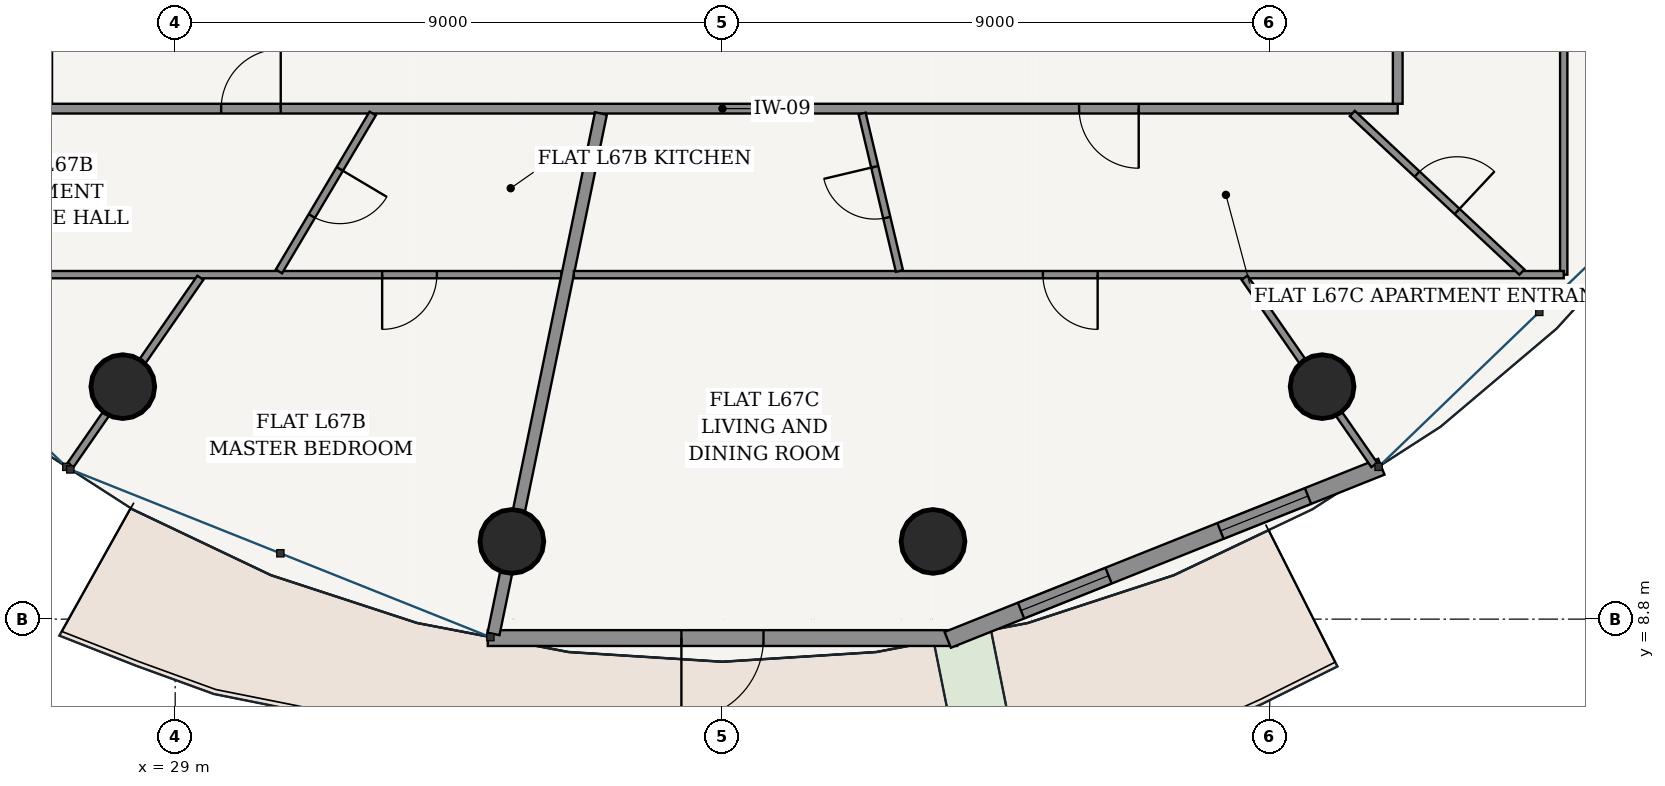
"""IFC4 building model, lengths in metres.
Left out: names, types, materials, properties, quantities, classifications, styles, units other than length and angle.
Written with IfcOpenShell. Run it as: python <this file> out.ifc"""

import sys

from ifc_helpers import new_model, si_unit, direction, frame, frame_2d, origin, origin_2d, place, context, subcontext, project, spatial, rectangle, hollow_circle, extrude, source, transform, mapped, element, fill, save


model = new_model("IFC4")
c1 = context("Model", 3, precision=1e-05, world=origin(), true_north=direction((-0.2419218956, 0.970295726276)))
c2 = subcontext(c1, "Body", "Model", "MODEL_VIEW")
j1 = project(units=[si_unit("LENGTHUNIT", "METRE"), si_unit("PLANEANGLEUNIT", "RADIAN")], contexts=[c1])
p1 = place(None, origin())
s1 = spatial("IfcSite", under=j1, at=p1, CompositionType="ELEMENT")
p2 = place(p1, origin())
s2 = spatial("IfcBuilding", under=s1, at=p2, CompositionType="ELEMENT")
p3 = place(p2, frame((0.0, 0.0, 255.7)))
s3 = spatial("IfcBuildingStorey", under=s2, at=p3, CompositionType="ELEMENT", Elevation=255.7)
for number, where, z_axis, x_axis in (
    (1, (28.139, 12.624, 0.0), (0.0, 0.0, 1.0), (1.0, 0.0, 0.0)),
    (2, (34.537, 10.078, 0.0), (0.0, 0.0, 1.0), (1.0, 0.0, 0.0)),
    (3, (41.463, 10.078, 0.0), (0.0, 0.0, 1.0), (1.0, 0.0, 0.0)),
    (4, (47.861, 12.624, 0.0), (0.0, 0.0, 1.0), (1.0, 0.0, 0.0)),
):
    element("IfcColumn", number, at=place(p3, frame(where, z_axis=z_axis, x_axis=x_axis)), inside=s3, PredefinedType="COLUMN", context=c2, shape_type="SweptSolid", body=[
        extrude(hollow_circle(Radius=0.525, WallThickness=0.035, at=origin_2d()), origin(), (0.0, 0.0, 1.0), 3.75),
    ])
p4 = place(p3, frame((34.141, 8.489, 0.0), z_axis=(0.0, 0.0, 1.0), x_axis=(1.0, 0.0, 0.0)))
e5 = element("IfcWall", 5, at=p4, inside=s3, PredefinedType="SOLIDWALL", context=c2, shape_type="SweptSolid", body=[
    extrude(rectangle(XDim=7.718, YDim=0.26, at=frame_2d((3.859, 0.0))), origin(), (0.0, 0.0, 1.0), 3.49),
])
p5 = place(p4, frame((3.184, 0.0, 0.0)))
e6 = element("IfcOpeningElement", 6, at=p5, cuts=e5, PredefinedType="OPENING", context=c2, shape_type="SweptSolid", body=[
    extrude(rectangle(XDim=1.35, YDim=2.2, at=frame_2d((0.675, 1.1))), frame((0.0, 0.14, 0.0), z_axis=(0.0, -1.0, 0.0), x_axis=(1.0, 0.0, 0.0)), (0.0, 0.0, 1.0), 0.28),
])
p6 = place(p3, frame((41.705, 8.459, 0.0), z_axis=(0.0, 0.0, 1.0), x_axis=(0.92871332341, 0.370798547626, 0.0)))
e7 = element("IfcWall", 7, at=p6, inside=s3, PredefinedType="SOLIDWALL", context=c2, shape_type="SweptSolid", body=[
    extrude(rectangle(XDim=7.678, YDim=0.28, at=frame_2d((3.839, 0.0))), origin(), (0.0, 0.0, 1.0), 3.49),
])
p7 = place(p6, frame((1.298, 0.0, 0.85)))
e8 = element("IfcOpeningElement", 8, at=p7, cuts=e7, PredefinedType="OPENING", context=c2, shape_type="SweptSolid", body=[
    extrude(rectangle(XDim=1.55, YDim=1.95, at=frame_2d((0.775, 0.975))), frame((0.0, 0.15, 0.0), z_axis=(0.0, -1.0, 0.0), x_axis=(1.0, 0.0, 0.0)), (0.0, 0.0, 1.0), 0.3),
])
p8 = place(p6, frame((4.83, 0.0, 0.85)))
e9 = element("IfcOpeningElement", 9, at=p8, cuts=e7, PredefinedType="OPENING", context=c2, shape_type="SweptSolid", body=[
    extrude(rectangle(XDim=1.55, YDim=1.95, at=frame_2d((0.775, 0.975))), frame((0.0, 0.15, 0.0), z_axis=(0.0, -1.0, 0.0), x_axis=(1.0, 0.0, 0.0)), (0.0, 0.0, 1.0), 0.3),
])
p9 = place(p3, frame((26.895, 17.195, 0.0), z_axis=(0.0, 0.0, 1.0), x_axis=(1.0, 0.0, 0.0)))
e10 = element("IfcWall", 10, at=p9, inside=s3, PredefinedType="PARTITIONING", context=c2, shape_type="SweptSolid", body=[
    extrude(rectangle(XDim=22.21, YDim=0.16, at=frame_2d((11.105, 0.0))), origin(), (0.0, 0.0, 1.0), 3.015),
])
p10 = place(p9, frame((2.861, 0.0, 0.0)))
e11 = element("IfcOpeningElement", 11, at=p10, cuts=e10, PredefinedType="OPENING", context=c2, shape_type="SweptSolid", body=[
    extrude(rectangle(XDim=0.98, YDim=2.2, at=frame_2d((0.49, 1.1))), frame((0.0, 0.09, 0.0), z_axis=(0.0, -1.0, 0.0), x_axis=(1.0, 0.0, 0.0)), (0.0, 0.0, 1.0), 0.18),
])
p11 = place(p9, frame((16.97, 0.0, 0.0)))
e12 = element("IfcOpeningElement", 12, at=p11, cuts=e10, PredefinedType="OPENING", context=c2, shape_type="SweptSolid", body=[
    extrude(rectangle(XDim=0.98, YDim=2.2, at=frame_2d((0.49, 1.1))), frame((0.0, 0.09, 0.0), z_axis=(0.0, -1.0, 0.0), x_axis=(1.0, 0.0, 0.0)), (0.0, 0.0, 1.0), 0.18),
])
for number, where, z_axis, x_axis in (
    (13, (26.895, 17.275, 0.0), (0.0, 0.0, 1.0), (0.0, 1.0, 0.0)),
    (14, (49.105, 17.275, 0.0), (0.0, 0.0, 1.0), (0.0, 1.0, 0.0)),
):
    element("IfcWall", number, at=place(p3, frame(where, z_axis=z_axis, x_axis=x_axis)), inside=s3, PredefinedType="PARTITIONING", context=c2, shape_type="SweptSolid", body=[
        extrude(rectangle(XDim=13.925, YDim=0.16, at=frame_2d((6.962, 0.0))), origin(), (0.0, 0.0, 1.0), 3.015),
    ])
p12 = place(p3, frame((35.353, 14.465, 0.0), z_axis=(0.0, 0.0, 1.0), x_axis=(-1.0, 0.0, 0.0)))
e15 = element("IfcWall", 15, at=p12, inside=s3, PredefinedType="PARTITIONING", context=c2, shape_type="SweptSolid", body=[
    extrude(rectangle(XDim=11.188, YDim=0.12, at=frame_2d((5.594, 0.0))), origin(), (0.0, 0.0, 1.0), 3.015),
])
p13 = place(p12, frame((2.049, 0.0, 0.0)))
e16 = element("IfcOpeningElement", 16, at=p13, cuts=e15, PredefinedType="OPENING", context=c2, shape_type="SweptSolid", body=[
    extrude(rectangle(XDim=0.9, YDim=2.15, at=frame_2d((0.45, 1.075))), frame((0.0, 0.07, 0.0), z_axis=(0.0, -1.0, 0.0), x_axis=(1.0, 0.0, 0.0)), (0.0, 0.0, 1.0), 0.14),
])
p14 = place(p3, frame((29.414, 14.414, 0.0), z_axis=(0.0, 0.0, 1.0), x_axis=(-0.569657021681, -0.821882520589, 0.0)))
e17 = element("IfcWall", 17, at=p14, inside=s3, PredefinedType="PARTITIONING", context=c2, shape_type="SweptSolid", body=[
    extrude(rectangle(XDim=3.748, YDim=0.12, at=frame_2d((1.874, 0.0))), origin(), (0.0, 0.0, 1.0), 3.015),
])
p15 = place(p3, frame((32.248, 17.115, 0.0), z_axis=(0.0, 0.0, 1.0), x_axis=(-0.510591051721, -0.85982369001, 0.0)))
e18 = element("IfcWall", 18, at=p15, inside=s3, PredefinedType="PARTITIONING", context=c2, shape_type="SweptSolid", body=[
    extrude(rectangle(XDim=3.02, YDim=0.12, at=frame_2d((1.51, 0.0))), origin(), (0.0, 0.0, 1.0), 3.209),
])
p16 = place(p15, frame((1.06, 0.0, 0.0)))
e19 = element("IfcOpeningElement", 19, at=p16, cuts=e18, PredefinedType="OPENING", context=c2, shape_type="SweptSolid", body=[
    extrude(rectangle(XDim=0.9, YDim=2.15, at=frame_2d((0.45, 1.075))), frame((0.0, 0.07, 0.0), z_axis=(0.0, -1.0, 0.0), x_axis=(1.0, 0.0, 0.0)), (0.0, 0.0, 1.0), 0.14),
])
p17 = place(p3, frame((36.001, 17.115, 0.0), z_axis=(0.0, 0.0, 1.0), x_axis=(-0.202108543081, -0.979363128167, 0.0)))
e20 = element("IfcWall", 20, at=p17, inside=s3, PredefinedType="PARTITIONING", context=c2, shape_type="SweptSolid", body=[
    extrude(rectangle(XDim=8.739, YDim=0.2, at=frame_2d((4.369, 0.0))), origin(), (0.0, 0.0, 1.0), 3.015),
])
p18 = place(p3, frame((51.835, 21.174, 0.0), z_axis=(0.0, 0.0, 1.0), x_axis=(0.0, -1.0, 0.0)))
e21 = element("IfcWall", 21, at=p18, inside=s3, PredefinedType="PARTITIONING", context=c2, shape_type="SweptSolid", body=[
    extrude(rectangle(XDim=6.709, YDim=0.12, at=frame_2d((3.354, 0.0))), origin(), (0.0, 0.0, 1.0), 3.015),
])
p19 = place(p18, frame((1.888, 0.0, 0.0)))
e22 = element("IfcOpeningElement", 22, at=p19, cuts=e21, PredefinedType="OPENING", context=c2, shape_type="SweptSolid", body=[
    extrude(rectangle(XDim=0.9, YDim=2.15, at=frame_2d((0.45, 1.075))), frame((0.0, 0.07, 0.0), z_axis=(0.0, -1.0, 0.0), x_axis=(1.0, 0.0, 0.0)), (0.0, 0.0, 1.0), 0.14),
])
p20 = place(p3, frame((51.835, 14.465, 0.0), z_axis=(0.0, 0.0, 1.0), x_axis=(-1.0, 0.0, 0.0)))
e23 = element("IfcWall", 23, at=p20, inside=s3, PredefinedType="PARTITIONING", context=c2, shape_type="SweptSolid", body=[
    extrude(rectangle(XDim=16.278, YDim=0.12, at=frame_2d((8.139, 0.0))), origin(), (0.0, 0.0, 1.0), 3.015),
])
p21 = place(p20, frame((7.665, 0.0, 0.0)))
e24 = element("IfcOpeningElement", 24, at=p21, cuts=e23, PredefinedType="OPENING", context=c2, shape_type="SweptSolid", body=[
    extrude(rectangle(XDim=0.9, YDim=2.15, at=frame_2d((0.45, 1.075))), frame((0.0, 0.07, 0.0), z_axis=(0.0, -1.0, 0.0), x_axis=(1.0, 0.0, 0.0)), (0.0, 0.0, 1.0), 0.14),
])
p22 = place(p3, frame((46.586, 14.414, 0.0), z_axis=(0.0, 0.0, 1.0), x_axis=(0.569657021681, -0.821882520589, 0.0)))
e25 = element("IfcWall", 25, at=p22, inside=s3, PredefinedType="PARTITIONING", context=c2, shape_type="SweptSolid", body=[
    extrude(rectangle(XDim=3.748, YDim=0.12, at=frame_2d((1.874, 0.0))), origin(), (0.0, 0.0, 1.0), 3.015),
])
p23 = place(p3, frame((40.296, 17.115, 0.0), z_axis=(0.0, 0.0, 1.0), x_axis=(0.230710960444, -0.973022328999, 0.0)))
e26 = element("IfcWall", 26, at=p23, inside=s3, PredefinedType="PARTITIONING", context=c2, shape_type="SweptSolid", body=[
    extrude(rectangle(XDim=2.661, YDim=0.12, at=frame_2d((1.331, 0.0))), origin(), (0.0, 0.0, 1.0), 3.49),
])
p24 = place(p23, frame((0.901, 0.0, 0.0)))
e27 = element("IfcOpeningElement", 27, at=p24, cuts=e26, PredefinedType="OPENING", context=c2, shape_type="SweptSolid", body=[
    extrude(rectangle(XDim=0.86, YDim=2.15, at=frame_2d((0.43, 1.075))), frame((0.0, 0.07, 0.0), z_axis=(0.0, -1.0, 0.0), x_axis=(1.0, 0.0, 0.0)), (0.0, 0.0, 1.0), 0.14),
])
p25 = place(p3, frame((48.358, 17.115, 0.0), z_axis=(0.0, 0.0, 1.0), x_axis=(0.730431927487, -0.682985504464, 0.0)))
e28 = element("IfcWall", 28, at=p25, inside=s3, PredefinedType="PARTITIONING", context=c2, shape_type="SweptSolid", body=[
    extrude(rectangle(XDim=3.818, YDim=0.12, at=frame_2d((1.909, 0.0))), origin(), (0.0, 0.0, 1.0), 3.121),
])
p26 = place(p25, frame((1.459, 0.0, 0.0)))
e29 = element("IfcOpeningElement", 29, at=p26, cuts=e28, PredefinedType="OPENING", context=c2, shape_type="SweptSolid", body=[
    extrude(rectangle(XDim=0.9, YDim=2.15, at=frame_2d((0.45, 1.075))), frame((0.0, 0.07, 0.0), z_axis=(0.0, -1.0, 0.0), x_axis=(1.0, 0.0, 0.0)), (0.0, 0.0, 1.0), 0.14),
])
m1 = source(origin(), c2, "Body", "SweptSolid", [
    extrude(rectangle(XDim=1.35, YDim=2.2, at=frame_2d((0.675, 1.1))), frame((0.0, 0.025, 0.0), z_axis=(0.0, -1.0, 0.0), x_axis=(1.0, 0.0, 0.0)), (0.0, 0.0, 1.0), 0.05),
])
p27 = place(p5, frame((1.35, 0.0, 0.0), z_axis=(0.0, 0.0, 1.0), x_axis=(-1.0, 0.0, 0.0)))
e30 = element("IfcDoor", 30, at=p27, inside=s3, OperationType="SINGLE_SWING_RIGHT", PredefinedType="DOOR", context=c2, shape_type="MappedRepresentation", body=[
    mapped(m1, transform((0.0, 0.0, 0.0), scale=1.0)),
])
fill(e6, e30)
m2 = source(origin(), c2, "Body", "SweptSolid", [
    extrude(rectangle(XDim=1.55, YDim=1.95, at=frame_2d((0.775, 0.975))), frame((0.0, 0.03, 0.0), z_axis=(0.0, -1.0, 0.0), x_axis=(1.0, 0.0, 0.0)), (0.0, 0.0, 1.0), 0.06),
])
p28 = place(p7, origin())
e31 = element("IfcWindow", 31, at=p28, inside=s3, PartitioningType="SINGLE_PANEL", PredefinedType="WINDOW", context=c2, shape_type="MappedRepresentation", body=[
    mapped(m2, transform((0.0, 0.0, 0.0), scale=1.0)),
])
fill(e8, e31)
p29 = place(p8, origin())
e32 = element("IfcWindow", 32, at=p29, inside=s3, PartitioningType="SINGLE_PANEL", PredefinedType="WINDOW", context=c2, shape_type="MappedRepresentation", body=[
    mapped(m2, transform((0.0, 0.0, 0.0), scale=1.0)),
])
fill(e9, e32)
m3 = source(origin(), c2, "Body", "SweptSolid", [
    extrude(rectangle(XDim=0.98, YDim=2.2, at=frame_2d((0.49, 1.1))), frame((0.0, 0.025, 0.0), z_axis=(0.0, -1.0, 0.0), x_axis=(1.0, 0.0, 0.0)), (0.0, 0.0, 1.0), 0.05),
])
p30 = place(p10, origin())
e33 = element("IfcDoor", 33, at=p30, inside=s3, OperationType="SINGLE_SWING_RIGHT", PredefinedType="DOOR", context=c2, shape_type="MappedRepresentation", body=[
    mapped(m3, transform((0.0, 0.0, 0.0), scale=1.0)),
])
fill(e11, e33)
m4 = source(origin(), c2, "Body", "SweptSolid", [
    extrude(rectangle(XDim=0.9, YDim=2.15, at=frame_2d((0.45, 1.075))), frame((0.0, 0.025, 0.0), z_axis=(0.0, -1.0, 0.0), x_axis=(1.0, 0.0, 0.0)), (0.0, 0.0, 1.0), 0.05),
])
p31 = place(p16, origin())
e34 = element("IfcDoor", 34, at=p31, inside=s3, OperationType="SINGLE_SWING_LEFT", PredefinedType="DOOR", context=c2, shape_type="MappedRepresentation", body=[
    mapped(m4, transform((0.0, 0.0, 0.0), scale=1.0)),
])
fill(e19, e34)
p32 = place(p13, origin())
e35 = element("IfcDoor", 35, at=p32, inside=s3, OperationType="SINGLE_SWING_RIGHT", PredefinedType="DOOR", context=c2, shape_type="MappedRepresentation", body=[
    mapped(m4, transform((0.0, 0.0, 0.0), scale=1.0)),
])
fill(e16, e35)
p33 = place(p11, frame((0.98, 0.0, 0.0), z_axis=(0.0, 0.0, 1.0), x_axis=(-1.0, 0.0, 0.0)))
e36 = element("IfcDoor", 36, at=p33, inside=s3, OperationType="SINGLE_SWING_LEFT", PredefinedType="DOOR", context=c2, shape_type="MappedRepresentation", body=[
    mapped(m3, transform((0.0, 0.0, 0.0), scale=1.0)),
])
fill(e12, e36)
m5 = source(origin(), c2, "Body", "SweptSolid", [
    extrude(rectangle(XDim=0.86, YDim=2.15, at=frame_2d((0.43, 1.075))), frame((0.0, 0.025, 0.0), z_axis=(0.0, -1.0, 0.0), x_axis=(1.0, 0.0, 0.0)), (0.0, 0.0, 1.0), 0.05),
])
p34 = place(p24, frame((0.86, 0.0, 0.0), z_axis=(0.0, 0.0, 1.0), x_axis=(-1.0, 0.0, 0.0)))
e37 = element("IfcDoor", 37, at=p34, inside=s3, OperationType="SINGLE_SWING_RIGHT", PredefinedType="DOOR", context=c2, shape_type="MappedRepresentation", body=[
    mapped(m5, transform((0.0, 0.0, 0.0), scale=1.0)),
])
fill(e27, e37)
p35 = place(p21, origin())
e38 = element("IfcDoor", 38, at=p35, inside=s3, OperationType="SINGLE_SWING_LEFT", PredefinedType="DOOR", context=c2, shape_type="MappedRepresentation", body=[
    mapped(m4, transform((0.0, 0.0, 0.0), scale=1.0)),
])
fill(e24, e38)
p36 = place(p26, origin())
e39 = element("IfcDoor", 39, at=p36, inside=s3, OperationType="SINGLE_SWING_RIGHT", PredefinedType="DOOR", context=c2, shape_type="MappedRepresentation", body=[
    mapped(m4, transform((0.0, 0.0, 0.0), scale=1.0)),
])
fill(e29, e39)
save(model, sys.argv[1])
